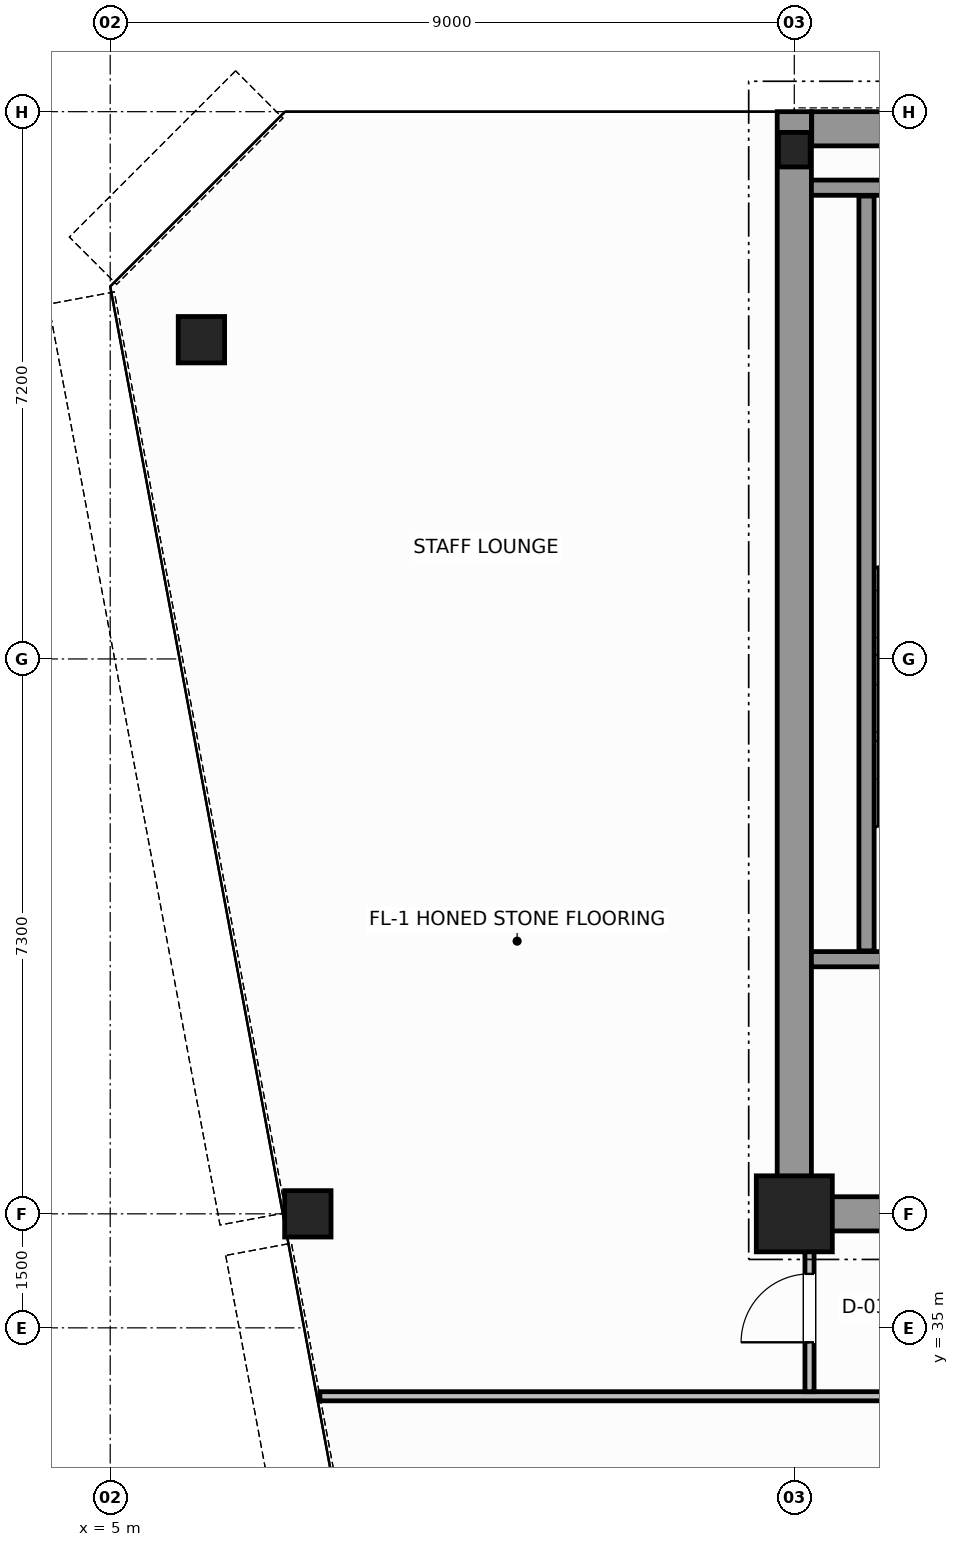
"""IFC4 building model, lengths in metres.
Left out: names, types, materials, properties, quantities, classifications, styles, units other than length and angle.
Written with IfcOpenShell. Run it as: python <this file> out.ifc"""

import sys

from ifc_helpers import new_model, si_unit, direction, frame, frame_2d, origin, origin_2d, place, context, subcontext, project, spatial, rectangle, hollow_circle, i_section, extrude, source, transform, mapped, element, fill, save


model = new_model("IFC4")
c1 = context("Model", 3, precision=1e-05, world=origin(), true_north=direction((0.0, 1.0)))
c2 = subcontext(c1, "Body", "Model", "MODEL_VIEW")
j1 = project(units=[si_unit("LENGTHUNIT", "METRE"), si_unit("PLANEANGLEUNIT", "RADIAN")], contexts=[c1])
p1 = place(None, origin())
s1 = spatial("IfcSite", under=j1, at=p1, CompositionType="ELEMENT")
p2 = place(p1, origin())
s2 = spatial("IfcBuilding", under=s1, at=p2, CompositionType="ELEMENT")
p3 = place(p2, frame((0.0, 0.0, 249.8)))
s3 = spatial("IfcBuildingStorey", under=s2, at=p3, CompositionType="ELEMENT", Elevation=249.8)
m1 = source(origin(), c2, "Body", "SweptSolid", [
    extrude(rectangle(XDim=1.0, YDim=1.0, at=origin_2d()), origin(), (0.0, 0.0, 1.0), 3.8),
])
p4 = place(p3, frame((14.0, 36.5, 0.0), z_axis=(0.0, 0.0, 1.0), x_axis=(1.0, 0.0, 0.0)))
e1 = element("IfcColumn", 1, at=p4, inside=s3, PredefinedType="COLUMN", context=c2, shape_type="MappedRepresentation", body=[
    mapped(m1, transform((0.0, 0.0, 0.0), scale=1.0)),
])
m2 = source(origin(), c2, "Body", "SweptSolid", [
    extrude(i_section(OverallWidth=0.418, OverallDepth=0.455, WebThickness=0.042, FlangeThickness=0.058, FilletRadius=0.015, at=origin_2d()), origin(), (0.0, 0.0, 1.0), 3.8),
])
p5 = place(p3, frame((14.0, 50.5, 0.0), z_axis=(0.0, 0.0, 1.0), x_axis=(1.0, 0.0, 0.0)))
e2 = element("IfcColumn", 2, at=p5, inside=s3, PredefinedType="COLUMN", context=c2, shape_type="MappedRepresentation", body=[
    mapped(m2, transform((0.0, 0.0, 0.0), scale=1.0)),
])
m3 = source(origin(), c2, "Body", "SweptSolid", [
    extrude(hollow_circle(Radius=0.305, WallThickness=0.03, at=origin_2d()), origin(), (0.0, 0.0, 1.0), 3.8),
])
for number, where, z_axis, x_axis in (
    (3, (6.2, 48.0, 0.0), (0.0, 0.0, 1.0), (1.0, 0.0, 0.0)),
    (4, (7.6, 36.5, 0.0), (0.0, 0.0, 1.0), (1.0, 0.0, 0.0)),
):
    element("IfcColumn", number, at=place(p3, frame(where, z_axis=z_axis, x_axis=x_axis)), inside=s3, PredefinedType="COLUMN", context=c2, shape_type="MappedRepresentation", body=[
        mapped(m3, transform((0.0, 0.0, 0.0), scale=1.0)),
    ])
p6 = place(p3, frame((14.229, 50.775, 0.0), z_axis=(0.0, 0.0, 1.0), x_axis=(1.0, 0.0, 0.0)))
e5 = element("IfcWall", 5, at=p6, inside=s3, PredefinedType="SHEAR", context=c2, shape_type="SweptSolid", body=[
    extrude(rectangle(XDim=19.769, YDim=0.45, at=frame_2d((9.885, 0.0))), origin(), (0.0, 0.0, 1.0), 3.8),
])
p7 = place(p3, frame((14.0, 36.5, 0.0), z_axis=(0.0, 0.0, 1.0), x_axis=(0.0, 1.0, 0.0)))
e6 = element("IfcWall", 6, at=p7, inside=s3, PredefinedType="SHEAR", context=c2, shape_type="SweptSolid", body=[
    extrude(rectangle(XDim=14.5, YDim=0.45, at=frame_2d((7.25, 0.0))), origin(), (0.0, 0.0, 1.0), 3.8),
])
p8 = place(p3, frame((14.245, 36.5, 0.0), z_axis=(0.0, 0.0, 1.0), x_axis=(1.0, 0.0, 0.0)))
e7 = element("IfcWall", 7, at=p8, inside=s3, PredefinedType="SHEAR", context=c2, shape_type="SweptSolid", body=[
    extrude(rectangle(XDim=3.955, YDim=0.45, at=frame_2d((1.978, 0.0))), origin(), (0.0, 0.0, 1.0), 2.58),
])
p9 = place(p3, frame((14.225, 39.85, 0.0), z_axis=(0.0, 0.0, 1.0), x_axis=(1.0, 0.0, 0.0)))
e8 = element("IfcWall", 8, at=p9, inside=s3, PredefinedType="SOLIDWALL", context=c2, shape_type="SweptSolid", body=[
    extrude(rectangle(XDim=4.375, YDim=0.2, at=frame_2d((2.188, 0.0))), origin(), (0.0, 0.0, 1.0), 3.8),
])
p10 = place(p9, frame((1.95, 0.0, 0.0)))
e9 = element("IfcOpeningElement", 9, at=p10, cuts=e8, PredefinedType="OPENING", context=c2, shape_type="SweptSolid", body=[
    extrude(rectangle(XDim=1.1, YDim=2.15, at=frame_2d((0.55, 1.075))), frame((0.0, 0.11, 0.0), z_axis=(0.0, -1.0, 0.0), x_axis=(1.0, 0.0, 0.0)), (0.0, 0.0, 1.0), 0.22),
])
p11 = place(p3, frame((14.225, 50.0, 0.0), z_axis=(0.0, 0.0, 1.0), x_axis=(1.0, 0.0, 0.0)))
e10 = element("IfcWall", 10, at=p11, inside=s3, PredefinedType="SOLIDWALL", context=c2, shape_type="SweptSolid", body=[
    extrude(rectangle(XDim=4.375, YDim=0.2, at=frame_2d((2.188, 0.0))), origin(), (0.0, 0.0, 1.0), 3.8),
])
p12 = place(p3, frame((14.95, 39.96, 0.0), z_axis=(0.0, 0.0, 1.0), x_axis=(0.0, 1.0, 0.0)))
e11 = element("IfcWall", 11, at=p12, inside=s3, PredefinedType="SOLIDWALL", context=c2, shape_type="SweptSolid", body=[
    extrude(rectangle(XDim=9.93, YDim=0.2, at=frame_2d((4.965, 0.0))), origin(), (0.0, 0.0, 1.0), 3.8),
])
p13 = place(p3, frame((7.759, 34.1, 0.0), z_axis=(0.0, 0.0, 1.0), x_axis=(1.0, 0.0, 0.0)))
e12 = element("IfcWall", 12, at=p13, inside=s3, PredefinedType="PARTITIONING", context=c2, shape_type="SweptSolid", body=[
    extrude(rectangle(XDim=11.582, YDim=0.12, at=frame_2d((5.791, 0.0))), origin(), (0.0, 0.0, 1.0), 3.58),
])
p14 = place(p3, frame((14.2, 34.16, 0.0), z_axis=(0.0, 0.0, 1.0), x_axis=(0.0, 1.0, 0.0)))
e13 = element("IfcWall", 13, at=p14, inside=s3, PredefinedType="PARTITIONING", context=c2, shape_type="SweptSolid", body=[
    extrude(rectangle(XDim=2.28, YDim=0.12, at=frame_2d((1.14, 0.0))), origin(), (0.0, 0.0, 1.0), 3.58),
])
p15 = place(p14, frame((0.65, 0.0, 0.0)))
e14 = element("IfcOpeningElement", 14, at=p15, cuts=e13, PredefinedType="OPENING", context=c2, shape_type="SweptSolid", body=[
    extrude(rectangle(XDim=0.9, YDim=2.15, at=frame_2d((0.45, 1.075))), frame((0.0, 0.07, 0.0), z_axis=(0.0, -1.0, 0.0), x_axis=(1.0, 0.0, 0.0)), (0.0, 0.0, 1.0), 0.14),
])
m4 = source(origin(), c2, "Body", "SweptSolid", [
    extrude(rectangle(XDim=0.9, YDim=2.15, at=frame_2d((0.45, 1.075))), frame((0.0, 0.025, 0.0), z_axis=(0.0, -1.0, 0.0), x_axis=(1.0, 0.0, 0.0)), (0.0, 0.0, 1.0), 0.05),
])
p16 = place(p15, origin())
e15 = element("IfcDoor", 15, at=p16, inside=s3, OperationType="SINGLE_SWING_LEFT", PredefinedType="DOOR", context=c2, shape_type="MappedRepresentation", body=[
    mapped(m4, transform((0.0, 0.0, 0.0), scale=1.0)),
])
fill(e14, e15)
save(model, sys.argv[1])
